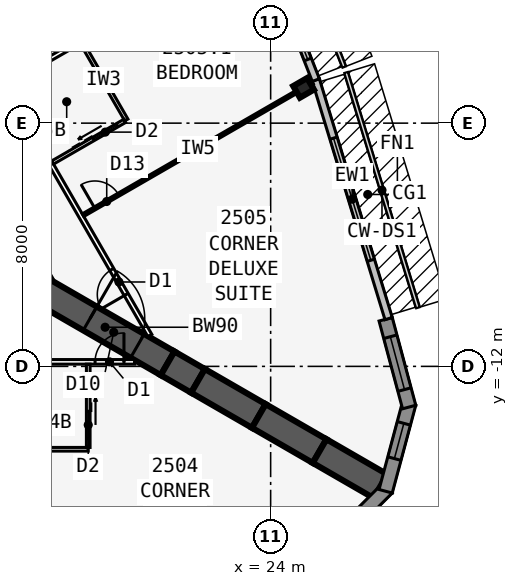
"""IFC4 building model, lengths in metres.
Left out: names, types, materials, properties, quantities, classifications, styles, units other than length and angle.
Written with IfcOpenShell. Run it as: python <this file> out.ifc"""

import sys

from ifc_helpers import new_model, si_unit, direction, frame, frame_2d, origin, origin_2d, place, context, subcontext, project, spatial, polyline, rectangle, i_section, outline, extrude, element, fill, save


model = new_model("IFC4")
c1 = context("Model", 3, precision=1e-05, world=origin(), true_north=direction((0.0, 1.0)))
c2 = subcontext(c1, "Body", "Model", "MODEL_VIEW")
j1 = project(units=[si_unit("LENGTHUNIT", "METRE"), si_unit("PLANEANGLEUNIT", "RADIAN")], contexts=[c1])
p1 = place(None, origin())
s1 = spatial("IfcSite", under=j1, at=p1, CompositionType="ELEMENT")
p2 = place(p1, origin())
s2 = spatial("IfcBuilding", under=s1, at=p2, CompositionType="ELEMENT")
p3 = place(p2, frame((0.0, 0.0, 96.5)))
s3 = spatial("IfcBuildingStorey", under=s2, at=p3, CompositionType="ELEMENT", Elevation=96.5)
p4 = place(p3, frame((16.5, -9.526, 0.0), z_axis=(0.0, 0.0, 1.0), x_axis=(-0.499999749417, 0.866025548458, 0.0)))
e1 = element("IfcWall", 1, at=p4, inside=s3, PredefinedType="SHEAR", context=c2, shape_type="SweptSolid", body=[
    extrude(rectangle(XDim=33.0, YDim=0.9, at=frame_2d((16.5, 0.0))), origin(), (0.0, 0.0, 1.0), 3.4),
])
p5 = place(p4, frame((14.15, 0.0, 0.0)))
e2 = element("IfcOpeningElement", 2, at=p5, cuts=e1, PredefinedType="OPENING", context=c2, shape_type="SweptSolid", body=[
    extrude(rectangle(XDim=1.8, YDim=2.13, at=frame_2d((0.9, 1.065))), frame((0.0, 0.46, 0.0), z_axis=(0.0, -1.0, 0.0), x_axis=(1.0, 0.0, 0.0)), (0.0, 0.0, 1.0), 0.92),
])
p6 = place(p4, frame((12.6, 0.0, 0.0)))
e3 = element("IfcOpeningElement", 3, at=p6, cuts=e1, PredefinedType="OPENING", context=c2, shape_type="SweptSolid", body=[
    extrude(rectangle(XDim=1.0, YDim=2.13, at=frame_2d((0.5, 1.065))), frame((0.0, 0.46, 0.0), z_axis=(0.0, -1.0, 0.0), x_axis=(1.0, 0.0, 0.0)), (0.0, 0.0, 1.0), 0.92),
])
p7 = place(p3, frame((16.5, -9.526, 0.0), z_axis=(0.0, 0.0, 1.0), x_axis=(0.866031398331, -0.499989616998, 0.0)))
e4 = element("IfcWall", 4, at=p7, inside=s3, PredefinedType="SHEAR", context=c2, shape_type="SweptSolid", body=[
    extrude(rectangle(XDim=4.746, YDim=0.9, at=frame_2d((2.373, 0.0))), origin(), (0.0, 0.0, 1.0), 3.4),
])
p8 = place(p7, frame((1.8, 0.0, 0.0)))
e5 = element("IfcOpeningElement", 5, at=p8, cuts=e4, PredefinedType="OPENING", context=c2, shape_type="SweptSolid", body=[
    extrude(rectangle(XDim=1.8, YDim=2.13, at=frame_2d((0.9, 1.065))), frame((0.0, 0.46, 0.0), z_axis=(0.0, -1.0, 0.0), x_axis=(1.0, 0.0, 0.0)), (0.0, 0.0, 1.0), 0.92),
])
p9 = place(p3, frame((20.61, -11.899, 0.0), z_axis=(0.0, 0.0, 1.0), x_axis=(0.866009537788, -0.500027479704, 0.0)))
e6 = element("IfcWall", 6, at=p9, inside=s3, PredefinedType="SHEAR", context=c2, shape_type="SweptSolid", body=[
    extrude(rectangle(XDim=1.155, YDim=0.9, at=frame_2d((0.577, 0.0))), origin(), (0.0, 0.0, 1.0), 3.4),
])
for number, where, z_axis, x_axis in (
    (7, (21.61, -12.477, 0.0), (0.0, 0.0, 1.0), (0.866, -0.5, 0.0)),
    (8, (23.61, -13.631, 0.0), (0.0, 0.0, 1.0), (0.866, -0.5, 0.0)),
    (9, (25.61, -14.786, 0.0), (0.0, 0.0, 1.0), (0.866, -0.5, 0.0)),
):
    element("IfcWall", number, at=place(p3, frame(where, z_axis=z_axis, x_axis=x_axis)), inside=s3, PredefinedType="SHEAR", context=c2, shape_type="SweptSolid", body=[
        extrude(rectangle(XDim=2.309, YDim=0.9, at=frame_2d((1.155, 0.0))), origin(), (0.0, 0.0, 1.0), 3.4),
    ])
p10 = place(p3, frame((25.083, -2.839, 0.0), z_axis=(0.0, 0.0, 1.0), x_axis=(-0.5, 0.866025403784, 0.0)))
e10 = element("IfcColumn", 10, at=p10, inside=s3, PredefinedType="COLUMN", context=c2, shape_type="SweptSolid", body=[
    extrude(i_section(OverallWidth=0.442, OverallDepth=0.531, WebThickness=0.066, FlangeThickness=0.106, at=origin_2d()), origin(), (0.0, 0.0, 1.0), 3.4),
])
p11 = place(p3, frame((25.728, -18.12, 0.0), z_axis=(0.0, 0.0, 1.0), x_axis=(0.707025086683, 0.707188466253, 0.0)))
e11 = element("IfcWall", 11, at=p11, inside=s3, PredefinedType="SOLIDWALL", context=c2, shape_type="SweptSolid", body=[
    extrude(outline(polyline([(2.989, 0.225), (2.93, 0.225), (2.438, 0.093), (2.402, 0.225), (0.0, 0.225), (0.0, -0.225), (2.989, -0.225), (2.989, 0.225)])), origin(), (0.0, 0.0, 1.0), 3.235),
])
p12 = place(p11, frame((0.676, 0.0, 0.45)))
e12 = element("IfcOpeningElement", 12, at=p12, cuts=e11, PredefinedType="OPENING", context=c2, shape_type="SweptSolid", body=[
    extrude(rectangle(XDim=1.2, YDim=2.4, at=frame_2d((0.6, 1.2))), frame((0.0, 0.235, 0.0), z_axis=(0.0, -1.0, 0.0), x_axis=(1.0, 0.0, 0.0)), (0.0, 0.0, 1.0), 0.47),
])
p13 = place(p3, frame((27.783, -16.108, 0.0), z_axis=(0.0, 0.0, 1.0), x_axis=(0.258801419081, 0.965930548995, 0.0)))
e13 = element("IfcWall", 13, at=p13, inside=s3, PredefinedType="SOLIDWALL", context=c2, shape_type="SweptSolid", body=[
    extrude(outline(polyline([(2.989, 0.225), (0.586, 0.225), (0.551, 0.093), (0.06, 0.225), (0.0, 0.225), (0.0, -0.225), (2.989, -0.225), (2.989, 0.225)])), origin(), (0.0, 0.0, 1.0), 3.235),
])
p14 = place(p13, frame((1.113, 0.0, 0.45)))
e14 = element("IfcOpeningElement", 14, at=p14, cuts=e13, PredefinedType="OPENING", context=c2, shape_type="SweptSolid", body=[
    extrude(rectangle(XDim=1.2, YDim=2.4, at=frame_2d((0.6, 1.2))), frame((0.0, 0.235, 0.0), z_axis=(0.0, -1.0, 0.0), x_axis=(1.0, 0.0, 0.0)), (0.0, 0.0, 1.0), 0.47),
])
p15 = place(p3, frame((28.556, -13.337, 0.0), z_axis=(0.0, 0.0, 1.0), x_axis=(-0.258780998834, 0.965936019953, 0.0)))
e15 = element("IfcWall", 15, at=p15, inside=s3, PredefinedType="SOLIDWALL", context=c2, shape_type="SweptSolid", body=[
    extrude(rectangle(XDim=2.989, YDim=0.45, at=frame_2d((1.494, 0.0))), origin(), (0.0, 0.0, 1.0), 3.235),
])
p16 = place(p15, frame((0.594, 0.0, 0.45)))
e16 = element("IfcOpeningElement", 16, at=p16, cuts=e15, PredefinedType="OPENING", context=c2, shape_type="SweptSolid", body=[
    extrude(rectangle(XDim=1.8, YDim=2.4, at=frame_2d((0.9, 1.2))), frame((0.0, 0.235, 0.0), z_axis=(0.0, -1.0, 0.0), x_axis=(1.0, 0.0, 0.0)), (0.0, 0.0, 1.0), 0.47),
])
p17 = place(p3, frame((27.88, -10.429, 0.0), z_axis=(0.0, 0.0, 1.0), x_axis=(-0.2919790669, 0.956424709265, 0.0)))
e17 = element("IfcWall", 17, at=p17, inside=s3, PredefinedType="STANDARD", context=c2, shape_type="SweptSolid", body=[
    extrude(rectangle(XDim=8.211, YDim=0.25, at=frame_2d((4.105, 0.0))), origin(), (0.0, 0.0, 1.0), 3.235),
])
p18 = place(p17, frame((2.006, 0.0, 0.45)))
e18 = element("IfcOpeningElement", 18, at=p18, cuts=e17, PredefinedType="OPENING", context=c2, shape_type="SweptSolid", body=[
    extrude(rectangle(XDim=4.2, YDim=2.4, at=frame_2d((2.1, 1.2))), frame((0.0, 0.135, 0.0), z_axis=(0.0, -1.0, 0.0), x_axis=(1.0, 0.0, 0.0)), (0.0, 0.0, 1.0), 0.27),
])
p19 = place(p3, frame((25.486, -2.584, 0.0), z_axis=(0.0, 0.0, 1.0), x_axis=(-0.364013463868, 0.931393685894, 0.0)))
e19 = element("IfcWall", 19, at=p19, inside=s3, PredefinedType="STANDARD", context=c2, shape_type="SweptSolid", body=[
    extrude(rectangle(XDim=5.058, YDim=0.25, at=frame_2d((2.529, 0.0))), origin(), (0.0, 0.0, 1.0), 3.235),
])
p20 = place(p19, frame((0.729, 0.0, 0.45)))
e20 = element("IfcOpeningElement", 20, at=p20, cuts=e19, PredefinedType="OPENING", context=c2, shape_type="SweptSolid", body=[
    extrude(rectangle(XDim=3.6, YDim=2.4, at=frame_2d((1.8, 1.2))), frame((0.0, 0.135, 0.0), z_axis=(0.0, -1.0, 0.0), x_axis=(1.0, 0.0, 0.0)), (0.0, 0.0, 1.0), 0.27),
])
p21 = place(p3, frame((-19.527, -11.851, 0.0), z_axis=(0.0, 0.0, 1.0), x_axis=(1.0, 0.0, 0.0)))
e21 = element("IfcWall", 21, at=p21, inside=s3, PredefinedType="PARTITIONING", context=c2, shape_type="SweptSolid", body=[
    extrude(rectangle(XDim=39.054, YDim=0.15, at=frame_2d((19.527, 0.0))), origin(), (0.0, 0.0, 1.0), 3.235),
])
p22 = place(p21, frame((1.558, 0.0, 0.0)))
e22 = element("IfcOpeningElement", 22, at=p22, cuts=e21, PredefinedType="OPENING", context=c2, shape_type="SweptSolid", body=[
    extrude(rectangle(XDim=0.95, YDim=2.13, at=frame_2d((0.475, 1.065))), frame((0.0, 0.085, 0.0), z_axis=(0.0, -1.0, 0.0), x_axis=(1.0, 0.0, 0.0)), (0.0, 0.0, 1.0), 0.17),
])
p23 = place(p21, frame((11.552, 0.0, 0.0)))
e23 = element("IfcOpeningElement", 23, at=p23, cuts=e21, PredefinedType="OPENING", context=c2, shape_type="SweptSolid", body=[
    extrude(rectangle(XDim=0.95, YDim=2.13, at=frame_2d((0.475, 1.065))), frame((0.0, 0.085, 0.0), z_axis=(0.0, -1.0, 0.0), x_axis=(1.0, 0.0, 0.0)), (0.0, 0.0, 1.0), 0.17),
])
p24 = place(p21, frame((21.527, 0.0, 0.0)))
e24 = element("IfcOpeningElement", 24, at=p24, cuts=e21, PredefinedType="OPENING", context=c2, shape_type="SweptSolid", body=[
    extrude(rectangle(XDim=1.0, YDim=2.13, at=frame_2d((0.5, 1.065))), frame((0.0, 0.085, 0.0), z_axis=(0.0, -1.0, 0.0), x_axis=(1.0, 0.0, 0.0)), (0.0, 0.0, 1.0), 0.17),
])
p25 = place(p21, frame((26.552, 0.0, 0.0)))
e25 = element("IfcOpeningElement", 25, at=p25, cuts=e21, PredefinedType="OPENING", context=c2, shape_type="SweptSolid", body=[
    extrude(rectangle(XDim=0.95, YDim=2.13, at=frame_2d((0.475, 1.065))), frame((0.0, 0.085, 0.0), z_axis=(0.0, -1.0, 0.0), x_axis=(1.0, 0.0, 0.0)), (0.0, 0.0, 1.0), 0.17),
])
p26 = place(p21, frame((37.752, 0.0, 0.0)))
e26 = element("IfcOpeningElement", 26, at=p26, cuts=e21, PredefinedType="OPENING", context=c2, shape_type="SweptSolid", body=[
    extrude(rectangle(XDim=0.95, YDim=2.13, at=frame_2d((0.475, 1.065))), frame((0.0, 0.085, 0.0), z_axis=(0.0, -1.0, 0.0), x_axis=(1.0, 0.0, 0.0)), (0.0, 0.0, 1.0), 0.17),
])
p27 = place(p3, frame((15.0, -14.726, 0.0), z_axis=(0.0, 0.0, 1.0), x_axis=(1.0, 0.0, 0.0)))
e27 = element("IfcWall", 27, at=p27, inside=s3, PredefinedType="PLUMBINGWALL", context=c2, shape_type="SweptSolid", body=[
    extrude(rectangle(XDim=3.0, YDim=0.12, at=frame_2d((1.5, 0.0))), origin(), (0.0, 0.0, 1.0), 3.235),
])
p28 = place(p3, frame((18.0, -11.926, 0.0), z_axis=(0.0, 0.0, 1.0), x_axis=(0.0, -1.0, 0.0)))
e28 = element("IfcWall", 28, at=p28, inside=s3, PredefinedType="PLUMBINGWALL", context=c2, shape_type="SweptSolid", body=[
    extrude(rectangle(XDim=2.74, YDim=0.12, at=frame_2d((1.37, 0.0))), origin(), (0.0, 0.0, 1.0), 3.235),
])
p29 = place(p28, frame((1.55, 0.0, 0.0)))
e29 = element("IfcOpeningElement", 29, at=p29, cuts=e28, PredefinedType="OPENING", context=c2, shape_type="SweptSolid", body=[
    extrude(rectangle(XDim=0.9, YDim=2.13, at=frame_2d((0.45, 1.065))), frame((0.0, 0.07, 0.0), z_axis=(0.0, -1.0, 0.0), x_axis=(1.0, 0.0, 0.0)), (0.0, 0.0, 1.0), 0.14),
])
p30 = place(p3, frame((20.027, -10.985, 0.0), z_axis=(0.0, 0.0, 1.0), x_axis=(-0.500001677587, 0.866024435227, 0.0)))
e30 = element("IfcWall", 30, at=p30, inside=s3, PredefinedType="PARTITIONING", context=c2, shape_type="SweptSolid", body=[
    extrude(rectangle(XDim=39.054, YDim=0.15, at=frame_2d((19.527, 0.0))), origin(), (0.0, 0.0, 1.0), 3.235),
])
p31 = place(p30, frame((1.558, 0.0, 0.0)))
e31 = element("IfcOpeningElement", 31, at=p31, cuts=e30, PredefinedType="OPENING", context=c2, shape_type="SweptSolid", body=[
    extrude(rectangle(XDim=0.95, YDim=2.13, at=frame_2d((0.475, 1.065))), frame((0.0, 0.085, 0.0), z_axis=(0.0, -1.0, 0.0), x_axis=(1.0, 0.0, 0.0)), (0.0, 0.0, 1.0), 0.17),
])
p32 = place(p30, frame((11.552, 0.0, 0.0)))
e32 = element("IfcOpeningElement", 32, at=p32, cuts=e30, PredefinedType="OPENING", context=c2, shape_type="SweptSolid", body=[
    extrude(rectangle(XDim=0.95, YDim=2.13, at=frame_2d((0.475, 1.065))), frame((0.0, 0.085, 0.0), z_axis=(0.0, -1.0, 0.0), x_axis=(1.0, 0.0, 0.0)), (0.0, 0.0, 1.0), 0.17),
])
p33 = place(p30, frame((22.752, 0.0, 0.0)))
e33 = element("IfcOpeningElement", 33, at=p33, cuts=e30, PredefinedType="OPENING", context=c2, shape_type="SweptSolid", body=[
    extrude(rectangle(XDim=0.95, YDim=2.13, at=frame_2d((0.475, 1.065))), frame((0.0, 0.085, 0.0), z_axis=(0.0, -1.0, 0.0), x_axis=(1.0, 0.0, 0.0)), (0.0, 0.0, 1.0), 0.17),
])
p34 = place(p30, frame((36.546, 0.0, 0.0)))
e34 = element("IfcOpeningElement", 34, at=p34, cuts=e30, PredefinedType="OPENING", context=c2, shape_type="SweptSolid", body=[
    extrude(rectangle(XDim=0.95, YDim=2.13, at=frame_2d((0.475, 1.065))), frame((0.0, 0.085, 0.0), z_axis=(0.0, -1.0, 0.0), x_axis=(1.0, 0.0, 0.0)), (0.0, 0.0, 1.0), 0.17),
])
p35 = place(p3, frame((17.829, -7.027, 0.0), z_axis=(0.0, 0.0, 1.0), x_axis=(0.866032659912, 0.499987431809, 0.0)))
e35 = element("IfcWall", 35, at=p35, inside=s3, PredefinedType="PARTITIONING", context=c2, shape_type="SweptSolid", body=[
    extrude(rectangle(XDim=8.72, YDim=0.1, at=frame_2d((4.36, 0.0))), origin(), (0.0, 0.0, 1.0), 2.389),
])
p36 = place(p35, frame((0.45, 0.0, 0.0)))
e36 = element("IfcOpeningElement", 36, at=p36, cuts=e35, PredefinedType="OPENING", context=c2, shape_type="SweptSolid", body=[
    extrude(rectangle(XDim=0.9, YDim=2.13, at=frame_2d((0.45, 1.065))), frame((0.0, 0.06, 0.0), z_axis=(0.0, -1.0, 0.0), x_axis=(1.0, 0.0, 0.0)), (0.0, 0.0, 1.0), 0.12),
])
p37 = place(p3, frame((15.329, -2.697, 0.0), z_axis=(0.0, 0.0, 1.0), x_axis=(0.866018409083, 0.500012114982, 0.0)))
e37 = element("IfcWall", 37, at=p37, inside=s3, PredefinedType="PARTITIONING", context=c2, shape_type="SweptSolid", body=[
    extrude(rectangle(XDim=9.485, YDim=0.15, at=frame_2d((4.742, 0.0))), origin(), (0.0, 0.0, 1.0), 2.389),
])
p38 = place(p3, frame((19.253, -3.895, 0.0), z_axis=(0.0, 0.0, 1.0), x_axis=(-0.499990139034, 0.866031096941, 0.0)))
e38 = element("IfcWall", 38, at=p38, inside=s3, PredefinedType="PLUMBINGWALL", context=c2, shape_type="SweptSolid", body=[
    extrude(rectangle(XDim=3.0, YDim=0.12, at=frame_2d((1.5, 0.0))), origin(), (0.0, 0.0, 1.0), 3.235),
])
p39 = place(p3, frame((16.829, -5.295, 0.0), z_axis=(0.0, 0.0, 1.0), x_axis=(0.866035715982, 0.499982138324, 0.0)))
e39 = element("IfcWall", 39, at=p39, inside=s3, PredefinedType="PLUMBINGWALL", context=c2, shape_type="SweptSolid", body=[
    extrude(rectangle(XDim=2.74, YDim=0.12, at=frame_2d((1.37, 0.0))), origin(), (0.0, 0.0, 1.0), 3.235),
])
p40 = place(p39, frame((1.55, 0.0, 0.0)))
e40 = element("IfcOpeningElement", 40, at=p40, cuts=e39, PredefinedType="OPENING", context=c2, shape_type="SweptSolid", body=[
    extrude(rectangle(XDim=0.9, YDim=2.13, at=frame_2d((0.45, 1.065))), frame((0.0, 0.07, 0.0), z_axis=(0.0, -1.0, 0.0), x_axis=(1.0, 0.0, 0.0)), (0.0, 0.0, 1.0), 0.14),
])
p41 = place(p14, origin())
e41 = element("IfcWindow", 41, at=p41, inside=s3, PartitioningType="SINGLE_PANEL", PredefinedType="WINDOW", context=c2, shape_type="SweptSolid", body=[
    extrude(rectangle(XDim=1.2, YDim=2.4, at=frame_2d((0.6, 1.2))), frame((0.0, 0.03, 0.0), z_axis=(0.0, -1.0, 0.0), x_axis=(1.0, 0.0, 0.0)), (0.0, 0.0, 1.0), 0.06),
])
fill(e14, e41)
p42 = place(p16, origin())
e42 = element("IfcWindow", 42, at=p42, inside=s3, PartitioningType="SINGLE_PANEL", PredefinedType="WINDOW", context=c2, shape_type="SweptSolid", body=[
    extrude(rectangle(XDim=1.8, YDim=2.4, at=frame_2d((0.9, 1.2))), frame((0.0, 0.03, 0.0), z_axis=(0.0, -1.0, 0.0), x_axis=(1.0, 0.0, 0.0)), (0.0, 0.0, 1.0), 0.06),
])
fill(e16, e42)
p43 = place(p18, origin())
e43 = element("IfcWindow", 43, at=p43, inside=s3, PartitioningType="SINGLE_PANEL", PredefinedType="WINDOW", context=c2, shape_type="SweptSolid", body=[
    extrude(rectangle(XDim=4.2, YDim=2.4, at=frame_2d((2.1, 1.2))), frame((0.0, 0.03, 0.0), z_axis=(0.0, -1.0, 0.0), x_axis=(1.0, 0.0, 0.0)), (0.0, 0.0, 1.0), 0.06),
])
fill(e18, e43)
p44 = place(p20, origin())
e44 = element("IfcWindow", 44, at=p44, inside=s3, PartitioningType="SINGLE_PANEL", PredefinedType="WINDOW", context=c2, shape_type="SweptSolid", body=[
    extrude(rectangle(XDim=3.6, YDim=2.4, at=frame_2d((1.8, 1.2))), frame((0.0, 0.03, 0.0), z_axis=(0.0, -1.0, 0.0), x_axis=(1.0, 0.0, 0.0)), (0.0, 0.0, 1.0), 0.06),
])
fill(e20, e44)
p45 = place(p29, origin())
e45 = element("IfcDoor", 45, at=p45, inside=s3, OperationType="SLIDING_TO_LEFT", PredefinedType="DOOR", context=c2, shape_type="SweptSolid", body=[
    extrude(rectangle(XDim=0.9, YDim=2.13, at=frame_2d((0.45, 1.065))), frame((0.0, 0.025, 0.0), z_axis=(0.0, -1.0, 0.0), x_axis=(1.0, 0.0, 0.0)), (0.0, 0.0, 1.0), 0.05),
])
fill(e29, e45)
p46 = place(p26, origin())
e46 = element("IfcDoor", 46, at=p46, inside=s3, OperationType="SINGLE_SWING_RIGHT", PredefinedType="DOOR", context=c2, shape_type="SweptSolid", body=[
    extrude(rectangle(XDim=0.95, YDim=2.13, at=frame_2d((0.475, 1.065))), frame((0.0, 0.025, 0.0), z_axis=(0.0, -1.0, 0.0), x_axis=(1.0, 0.0, 0.0)), (0.0, 0.0, 1.0), 0.05),
])
fill(e26, e46)
p47 = place(p36, origin())
e47 = element("IfcDoor", 47, at=p47, inside=s3, OperationType="SINGLE_SWING_LEFT", PredefinedType="DOOR", context=c2, shape_type="SweptSolid", body=[
    extrude(rectangle(XDim=0.9, YDim=2.13, at=frame_2d((0.45, 1.065))), frame((0.0, 0.025, 0.0), z_axis=(0.0, -1.0, 0.0), x_axis=(1.0, 0.0, 0.0)), (0.0, 0.0, 1.0), 0.05),
])
fill(e36, e47)
p48 = place(p31, origin())
e48 = element("IfcDoor", 48, at=p48, inside=s3, OperationType="SINGLE_SWING_LEFT", PredefinedType="DOOR", context=c2, shape_type="SweptSolid", body=[
    extrude(rectangle(XDim=0.95, YDim=2.13, at=frame_2d((0.475, 1.065))), frame((0.0, 0.025, 0.0), z_axis=(0.0, -1.0, 0.0), x_axis=(1.0, 0.0, 0.0)), (0.0, 0.0, 1.0), 0.05),
])
fill(e31, e48)
p49 = place(p40, origin())
e49 = element("IfcDoor", 49, at=p49, inside=s3, OperationType="SLIDING_TO_LEFT", PredefinedType="DOOR", context=c2, shape_type="SweptSolid", body=[
    extrude(rectangle(XDim=0.9, YDim=2.13, at=frame_2d((0.45, 1.065))), frame((0.0, 0.025, 0.0), z_axis=(0.0, -1.0, 0.0), x_axis=(1.0, 0.0, 0.0)), (0.0, 0.0, 1.0), 0.05),
])
fill(e40, e49)
p50 = place(p8, origin())
e50 = element("IfcDoor", 50, at=p50, inside=s3, OperationType="DOUBLE_DOOR_DOUBLE_SWING", PredefinedType="DOOR", context=c2, shape_type="SweptSolid", body=[
    extrude(rectangle(XDim=1.8, YDim=2.13, at=frame_2d((0.9, 1.065))), frame((0.0, 0.025, 0.0), z_axis=(0.0, -1.0, 0.0), x_axis=(1.0, 0.0, 0.0)), (0.0, 0.0, 1.0), 0.05),
])
fill(e5, e50)
save(model, sys.argv[1])
